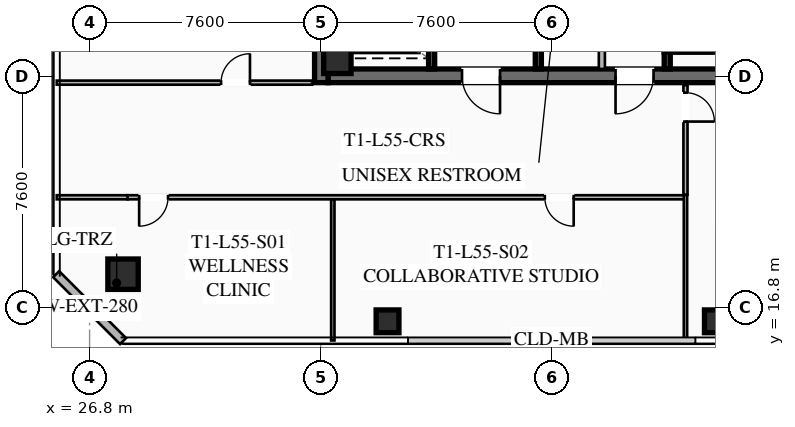
"""IFC4 building model, lengths in metres.
Left out: names, types, materials, properties, quantities, classifications, styles, units other than length and angle.
Written with IfcOpenShell. Run it as: python <this file> out.ifc"""

import sys

from ifc_helpers import new_model, si_unit, direction, frame, frame_2d, origin, origin_2d, place, context, subcontext, project, spatial, rectangle, hollow_rectangle, extrude, element, fill, save


model = new_model("IFC4")
c1 = context("Model", 3, precision=1e-05, world=origin(), true_north=direction((0.0, 1.0)))
c2 = subcontext(c1, "Body", "Model", "MODEL_VIEW")
j1 = project(units=[si_unit("LENGTHUNIT", "METRE"), si_unit("PLANEANGLEUNIT", "RADIAN")], contexts=[c1])
p1 = place(None, origin())
s1 = spatial("IfcSite", under=j1, at=p1, CompositionType="ELEMENT")
p2 = place(p1, origin())
s2 = spatial("IfcBuilding", under=s1, at=p2, CompositionType="ELEMENT")
p3 = place(p2, frame((0.0, 0.0, 204.2)))
s3 = spatial("IfcBuildingStorey", under=s2, at=p3, CompositionType="ELEMENT", Elevation=204.2)
p4 = place(p3, frame((34.425, 24.2, 0.0), z_axis=(0.0, 0.0, 1.0), x_axis=(0.0, 1.0, 0.0)))
e1 = element("IfcWall", 1, at=p4, inside=s3, PredefinedType="SHEAR", context=c2, shape_type="SweptSolid", body=[
    extrude(rectangle(XDim=15.6, YDim=0.45, at=frame_2d((7.8, 0.0))), origin(), (0.0, 0.0, 1.0), 3.55),
])
p5 = place(p3, frame((49.35, 24.425, 0.0), z_axis=(0.0, 0.0, 1.0), x_axis=(-1.0, 0.0, 0.0)))
e2 = element("IfcWall", 2, at=p5, inside=s3, PredefinedType="SHEAR", context=c2, shape_type="SweptSolid", body=[
    extrude(rectangle(XDim=14.7, YDim=0.45, at=frame_2d((7.35, 0.0))), origin(), (0.0, 0.0, 1.0), 3.55),
])
p6 = place(p5, frame((9.05, 0.0, 0.0)))
e3 = element("IfcOpeningElement", 3, at=p6, cuts=e2, PredefinedType="OPENING", context=c2, shape_type="SweptSolid", body=[
    extrude(rectangle(XDim=1.25, YDim=2.25, at=frame_2d((0.625, 1.125))), frame((0.0, 0.235, 0.0), z_axis=(0.0, -1.0, 0.0), x_axis=(1.0, 0.0, 0.0)), (0.0, 0.0, 1.0), 0.47),
])
p7 = place(p5, frame((4.0, 0.0, 0.0)))
e4 = element("IfcOpeningElement", 4, at=p7, cuts=e2, PredefinedType="OPENING", context=c2, shape_type="SweptSolid", body=[
    extrude(rectangle(XDim=1.25, YDim=2.25, at=frame_2d((0.625, 1.125))), frame((0.0, 0.235, 0.0), z_axis=(0.0, -1.0, 0.0), x_axis=(1.0, 0.0, 0.0)), (0.0, 0.0, 1.0), 0.47),
])
p8 = place(p3, frame((34.95, 24.95, 0.0), z_axis=(0.0, 0.0, 1.0), x_axis=(1.0, 0.0, 0.0)))
e5 = element("IfcColumn", 5, at=p8, inside=s3, PredefinedType="COLUMN", context=c2, shape_type="SweptSolid", body=[
    extrude(hollow_rectangle(XDim=0.9, YDim=0.9, WallThickness=0.04, at=origin_2d()), origin(), (0.0, 0.0, 1.0), 3.37),
])
p9 = place(p3, frame((27.9, 17.9, 0.0), z_axis=(0.0, 0.0, 1.0), x_axis=(1.0, 0.0, 0.0)))
e6 = element("IfcColumn", 6, at=p9, inside=s3, PredefinedType="COLUMN", context=c2, shape_type="SweptSolid", body=[
    extrude(hollow_rectangle(XDim=1.0, YDim=1.0, WallThickness=0.04, at=origin_2d()), origin(), (0.0, 0.0, 1.0), 3.37),
])
for number, where, z_axis, x_axis in (
    (7, (36.6, 16.35, 0.0), (0.0, 0.0, 1.0), (1.0, 0.0, 0.0)),
    (8, (47.4, 16.35, 0.0), (0.0, 0.0, 1.0), (1.0, 0.0, 0.0)),
):
    element("IfcColumn", number, at=place(p3, frame(where, z_axis=z_axis, x_axis=x_axis)), inside=s3, PredefinedType="COLUMN", context=c2, shape_type="SweptSolid", body=[
        extrude(hollow_rectangle(XDim=0.75, YDim=0.75, WallThickness=0.032, at=origin_2d()), origin(), (0.0, 0.0, 1.0), 3.37),
    ])
p10 = place(p3, frame((27.9, 15.7, 0.0), z_axis=(0.0, 0.0, 1.0), x_axis=(-0.707106781187, 0.707106781187, 0.0)))
e9 = element("IfcWall", 9, at=p10, inside=s3, PredefinedType="SOLIDWALL", context=c2, shape_type="SweptSolid", body=[
    extrude(rectangle(XDim=3.111, YDim=0.28, at=frame_2d((1.556, 0.0))), origin(), (0.0, 0.0, 1.0), 3.37),
])
p11 = place(p3, frame((45.8, 32.8, 0.0), z_axis=(0.0, 0.0, 1.0), x_axis=(0.0, -1.0, 0.0)))
e10 = element("IfcWall", 10, at=p11, inside=s3, PredefinedType="SHEAR", context=c2, shape_type="SweptSolid", body=[
    extrude(rectangle(XDim=8.15, YDim=0.2, at=frame_2d((4.075, 0.0))), origin(), (0.0, 0.0, 1.0), 3.37),
])
p12 = place(p11, frame((0.45, 0.0, 0.0)))
e11 = element("IfcOpeningElement", 11, at=p12, cuts=e10, PredefinedType="OPENING", context=c2, shape_type="SweptSolid", body=[
    extrude(rectangle(XDim=1.15, YDim=2.2, at=frame_2d((0.575, 1.1))), frame((0.0, 0.11, 0.0), z_axis=(0.0, -1.0, 0.0), x_axis=(1.0, 0.0, 0.0)), (0.0, 0.0, 1.0), 0.22),
])
p13 = place(p3, frame((41.56, 24.65, 0.0), z_axis=(0.0, 0.0, 1.0), x_axis=(0.0, 1.0, 0.0)))
e12 = element("IfcWall", 12, at=p13, inside=s3, PredefinedType="SHEAR", context=c2, shape_type="SweptSolid", body=[
    extrude(rectangle(XDim=14.7, YDim=0.2, at=frame_2d((7.35, 0.0))), origin(), (0.0, 0.0, 1.0), 3.37),
])
p14 = place(p3, frame((38.05, 24.65, 0.0), z_axis=(0.0, 0.0, 1.0), x_axis=(0.0, 1.0, 0.0)))
e13 = element("IfcWall", 13, at=p14, inside=s3, PredefinedType="SHEAR", context=c2, shape_type="SweptSolid", body=[
    extrude(rectangle(XDim=6.55, YDim=0.2, at=frame_2d((3.275, 0.0))), origin(), (0.0, 0.0, 1.0), 3.37),
])
p15 = place(p14, frame((4.975, 0.0, 0.0)))
e14 = element("IfcOpeningElement", 14, at=p15, cuts=e13, PredefinedType="OPENING", context=c2, shape_type="SweptSolid", body=[
    extrude(rectangle(XDim=1.3, YDim=2.25, at=frame_2d((0.65, 1.125))), frame((0.0, 0.11, 0.0), z_axis=(0.0, -1.0, 0.0), x_axis=(1.0, 0.0, 0.0)), (0.0, 0.0, 1.0), 0.22),
])
p16 = place(p14, frame((2.975, 0.0, 0.0)))
e15 = element("IfcOpeningElement", 15, at=p16, cuts=e13, PredefinedType="OPENING", context=c2, shape_type="SweptSolid", body=[
    extrude(rectangle(XDim=1.3, YDim=2.25, at=frame_2d((0.65, 1.125))), frame((0.0, 0.11, 0.0), z_axis=(0.0, -1.0, 0.0), x_axis=(1.0, 0.0, 0.0)), (0.0, 0.0, 1.0), 0.22),
])
p17 = place(p14, frame((0.775, 0.0, 0.0)))
e16 = element("IfcOpeningElement", 16, at=p17, cuts=e13, PredefinedType="OPENING", context=c2, shape_type="SweptSolid", body=[
    extrude(rectangle(XDim=1.3, YDim=2.25, at=frame_2d((0.65, 1.125))), frame((0.0, 0.11, 0.0), z_axis=(0.0, -1.0, 0.0), x_axis=(1.0, 0.0, 0.0)), (0.0, 0.0, 1.0), 0.22),
])
p18 = place(p3, frame((43.65, 24.65, 0.0), z_axis=(0.0, 0.0, 1.0), x_axis=(0.0, 1.0, 0.0)))
e17 = element("IfcWall", 17, at=p18, inside=s3, PredefinedType="SOLIDWALL", context=c2, shape_type="SweptSolid", body=[
    extrude(rectangle(XDim=7.0, YDim=0.2, at=frame_2d((3.5, 0.0))), origin(), (0.0, 0.0, 1.0), 2.723),
])
p19 = place(p18, frame((0.85, 0.0, 0.0)))
e18 = element("IfcOpeningElement", 18, at=p19, cuts=e17, PredefinedType="OPENING", context=c2, shape_type="SweptSolid", body=[
    extrude(rectangle(XDim=0.95, YDim=2.05, at=frame_2d((0.475, 1.025))), frame((0.0, 0.11, 0.0), z_axis=(0.0, -1.0, 0.0), x_axis=(1.0, 0.0, 0.0)), (0.0, 0.0, 1.0), 0.22),
])
p20 = place(p18, frame((4.8, 0.0, 0.0)))
e19 = element("IfcOpeningElement", 19, at=p20, cuts=e17, PredefinedType="OPENING", context=c2, shape_type="SweptSolid", body=[
    extrude(rectangle(XDim=1.05, YDim=2.2, at=frame_2d((0.525, 1.1))), frame((0.0, 0.11, 0.0), z_axis=(0.0, -1.0, 0.0), x_axis=(1.0, 0.0, 0.0)), (0.0, 0.0, 1.0), 0.22),
])
p21 = place(p3, frame((46.4, 20.43, 0.0), z_axis=(0.0, 0.0, 1.0), x_axis=(-1.0, 0.0, 0.0)))
e20 = element("IfcWall", 20, at=p21, inside=s3, PredefinedType="PARTITIONING", context=c2, shape_type="SweptSolid", body=[
    extrude(rectangle(XDim=18.35, YDim=0.135, at=frame_2d((9.175, 0.0))), origin(), (0.0, 0.0, 1.0), 2.723),
])
p22 = place(p21, frame((17.02, 0.0, 0.0)))
e21 = element("IfcOpeningElement", 21, at=p22, cuts=e20, PredefinedType="OPENING", context=c2, shape_type="SweptSolid", body=[
    extrude(rectangle(XDim=0.95, YDim=2.05, at=frame_2d((0.475, 1.025))), frame((0.0, 0.077, 0.0), z_axis=(0.0, -1.0, 0.0), x_axis=(1.0, 0.0, 0.0)), (0.0, 0.0, 1.0), 0.155),
])
p23 = place(p21, frame((3.677, 0.0, 0.0)))
e22 = element("IfcOpeningElement", 22, at=p23, cuts=e20, PredefinedType="OPENING", context=c2, shape_type="SweptSolid", body=[
    extrude(rectangle(XDim=0.95, YDim=2.05, at=frame_2d((0.475, 1.025))), frame((0.0, 0.077, 0.0), z_axis=(0.0, -1.0, 0.0), x_axis=(1.0, 0.0, 0.0)), (0.0, 0.0, 1.0), 0.155),
])
p24 = place(p3, frame((25.72, 20.43, 0.0), z_axis=(0.0, 0.0, 1.0), x_axis=(1.0, 0.0, 0.0)))
e23 = element("IfcWall", 23, at=p24, inside=s3, PredefinedType="PARTITIONING", context=c2, shape_type="SweptSolid", body=[
    extrude(rectangle(XDim=2.33, YDim=0.135, at=frame_2d((1.165, 0.0))), origin(), (0.0, 0.0, 1.0), 2.723),
])
p25 = place(p3, frame((46.4, 24.12, 0.0), z_axis=(0.0, 0.0, 1.0), x_axis=(0.0, -1.0, 0.0)))
e24 = element("IfcWall", 24, at=p25, inside=s3, PredefinedType="PARTITIONING", context=c2, shape_type="SweptSolid", body=[
    extrude(rectangle(XDim=3.61, YDim=0.135, at=frame_2d((1.805, 0.0))), origin(), (0.0, 0.0, 1.0), 2.723),
])
p26 = place(p25, frame((0.25, 0.0, 0.0)))
e25 = element("IfcOpeningElement", 25, at=p26, cuts=e24, PredefinedType="OPENING", context=c2, shape_type="SweptSolid", body=[
    extrude(rectangle(XDim=0.95, YDim=2.05, at=frame_2d((0.475, 1.025))), frame((0.0, 0.077, 0.0), z_axis=(0.0, -1.0, 0.0), x_axis=(1.0, 0.0, 0.0)), (0.0, 0.0, 1.0), 0.155),
])
p27 = place(p3, frame((34.8, 15.72, 0.0), z_axis=(0.0, 0.0, 1.0), x_axis=(0.0, 1.0, 0.0)))
e26 = element("IfcWall", 26, at=p27, inside=s3, PredefinedType="PARTITIONING", context=c2, shape_type="SweptSolid", body=[
    extrude(rectangle(XDim=4.63, YDim=0.11, at=frame_2d((2.315, 0.0))), origin(), (0.0, 0.0, 1.0), 2.723),
])
p28 = place(p3, frame((46.4, 15.72, 0.0), z_axis=(0.0, 0.0, 1.0), x_axis=(0.0, 1.0, 0.0)))
e27 = element("IfcWall", 27, at=p28, inside=s3, PredefinedType="PARTITIONING", context=c2, shape_type="SweptSolid", body=[
    extrude(rectangle(XDim=4.79, YDim=0.11, at=frame_2d((2.395, 0.0))), origin(), (0.0, 0.0, 1.0), 2.723),
])
p29 = place(p3, frame((25.72, 24.2, 0.0), z_axis=(0.0, 0.0, 1.0), x_axis=(1.0, 0.0, 0.0)))
e28 = element("IfcWall", 28, at=p29, inside=s3, PredefinedType="PARTITIONING", context=c2, shape_type="SweptSolid", body=[
    extrude(rectangle(XDim=8.4, YDim=0.135, at=frame_2d((4.2, 0.0))), origin(), (0.0, 0.0, 1.0), 2.723),
])
p30 = place(p29, frame((5.405, 0.0, 0.0)))
e29 = element("IfcOpeningElement", 29, at=p30, cuts=e28, PredefinedType="OPENING", context=c2, shape_type="SweptSolid", body=[
    extrude(rectangle(XDim=0.95, YDim=2.05, at=frame_2d((0.475, 1.025))), frame((0.0, 0.077, 0.0), z_axis=(0.0, -1.0, 0.0), x_axis=(1.0, 0.0, 0.0)), (0.0, 0.0, 1.0), 0.155),
])
p31 = place(p6, origin())
e30 = element("IfcDoor", 30, at=p31, inside=s3, OperationType="SINGLE_SWING_LEFT", PredefinedType="DOOR", context=c2, shape_type="SweptSolid", body=[
    extrude(rectangle(XDim=1.25, YDim=2.25, at=frame_2d((0.625, 1.125))), frame((0.0, 0.025, 0.0), z_axis=(0.0, -1.0, 0.0), x_axis=(1.0, 0.0, 0.0)), (0.0, 0.0, 1.0), 0.05),
])
fill(e3, e30)
p32 = place(p7, origin())
e31 = element("IfcDoor", 31, at=p32, inside=s3, OperationType="SINGLE_SWING_RIGHT", PredefinedType="DOOR", context=c2, shape_type="SweptSolid", body=[
    extrude(rectangle(XDim=1.25, YDim=2.25, at=frame_2d((0.625, 1.125))), frame((0.0, 0.025, 0.0), z_axis=(0.0, -1.0, 0.0), x_axis=(1.0, 0.0, 0.0)), (0.0, 0.0, 1.0), 0.05),
])
fill(e4, e31)
p33 = place(p22, origin())
e32 = element("IfcDoor", 32, at=p33, inside=s3, OperationType="SINGLE_SWING_RIGHT", PredefinedType="DOOR", context=c2, shape_type="SweptSolid", body=[
    extrude(rectangle(XDim=0.95, YDim=2.05, at=frame_2d((0.475, 1.025))), frame((0.0, 0.025, 0.0), z_axis=(0.0, -1.0, 0.0), x_axis=(1.0, 0.0, 0.0)), (0.0, 0.0, 1.0), 0.05),
])
fill(e21, e32)
p34 = place(p23, origin())
e33 = element("IfcDoor", 33, at=p34, inside=s3, OperationType="SINGLE_SWING_LEFT", PredefinedType="DOOR", context=c2, shape_type="SweptSolid", body=[
    extrude(rectangle(XDim=0.95, YDim=2.05, at=frame_2d((0.475, 1.025))), frame((0.0, 0.025, 0.0), z_axis=(0.0, -1.0, 0.0), x_axis=(1.0, 0.0, 0.0)), (0.0, 0.0, 1.0), 0.05),
])
fill(e22, e33)
p35 = place(p26, origin())
e34 = element("IfcDoor", 34, at=p35, inside=s3, OperationType="SINGLE_SWING_RIGHT", PredefinedType="DOOR", context=c2, shape_type="SweptSolid", body=[
    extrude(rectangle(XDim=0.95, YDim=2.05, at=frame_2d((0.475, 1.025))), frame((0.0, 0.025, 0.0), z_axis=(0.0, -1.0, 0.0), x_axis=(1.0, 0.0, 0.0)), (0.0, 0.0, 1.0), 0.05),
])
fill(e25, e34)
p36 = place(p30, origin())
e35 = element("IfcDoor", 35, at=p36, inside=s3, OperationType="SINGLE_SWING_RIGHT", PredefinedType="DOOR", context=c2, shape_type="SweptSolid", body=[
    extrude(rectangle(XDim=0.95, YDim=2.05, at=frame_2d((0.475, 1.025))), frame((0.0, 0.025, 0.0), z_axis=(0.0, -1.0, 0.0), x_axis=(1.0, 0.0, 0.0)), (0.0, 0.0, 1.0), 0.05),
])
fill(e29, e35)
save(model, sys.argv[1])
